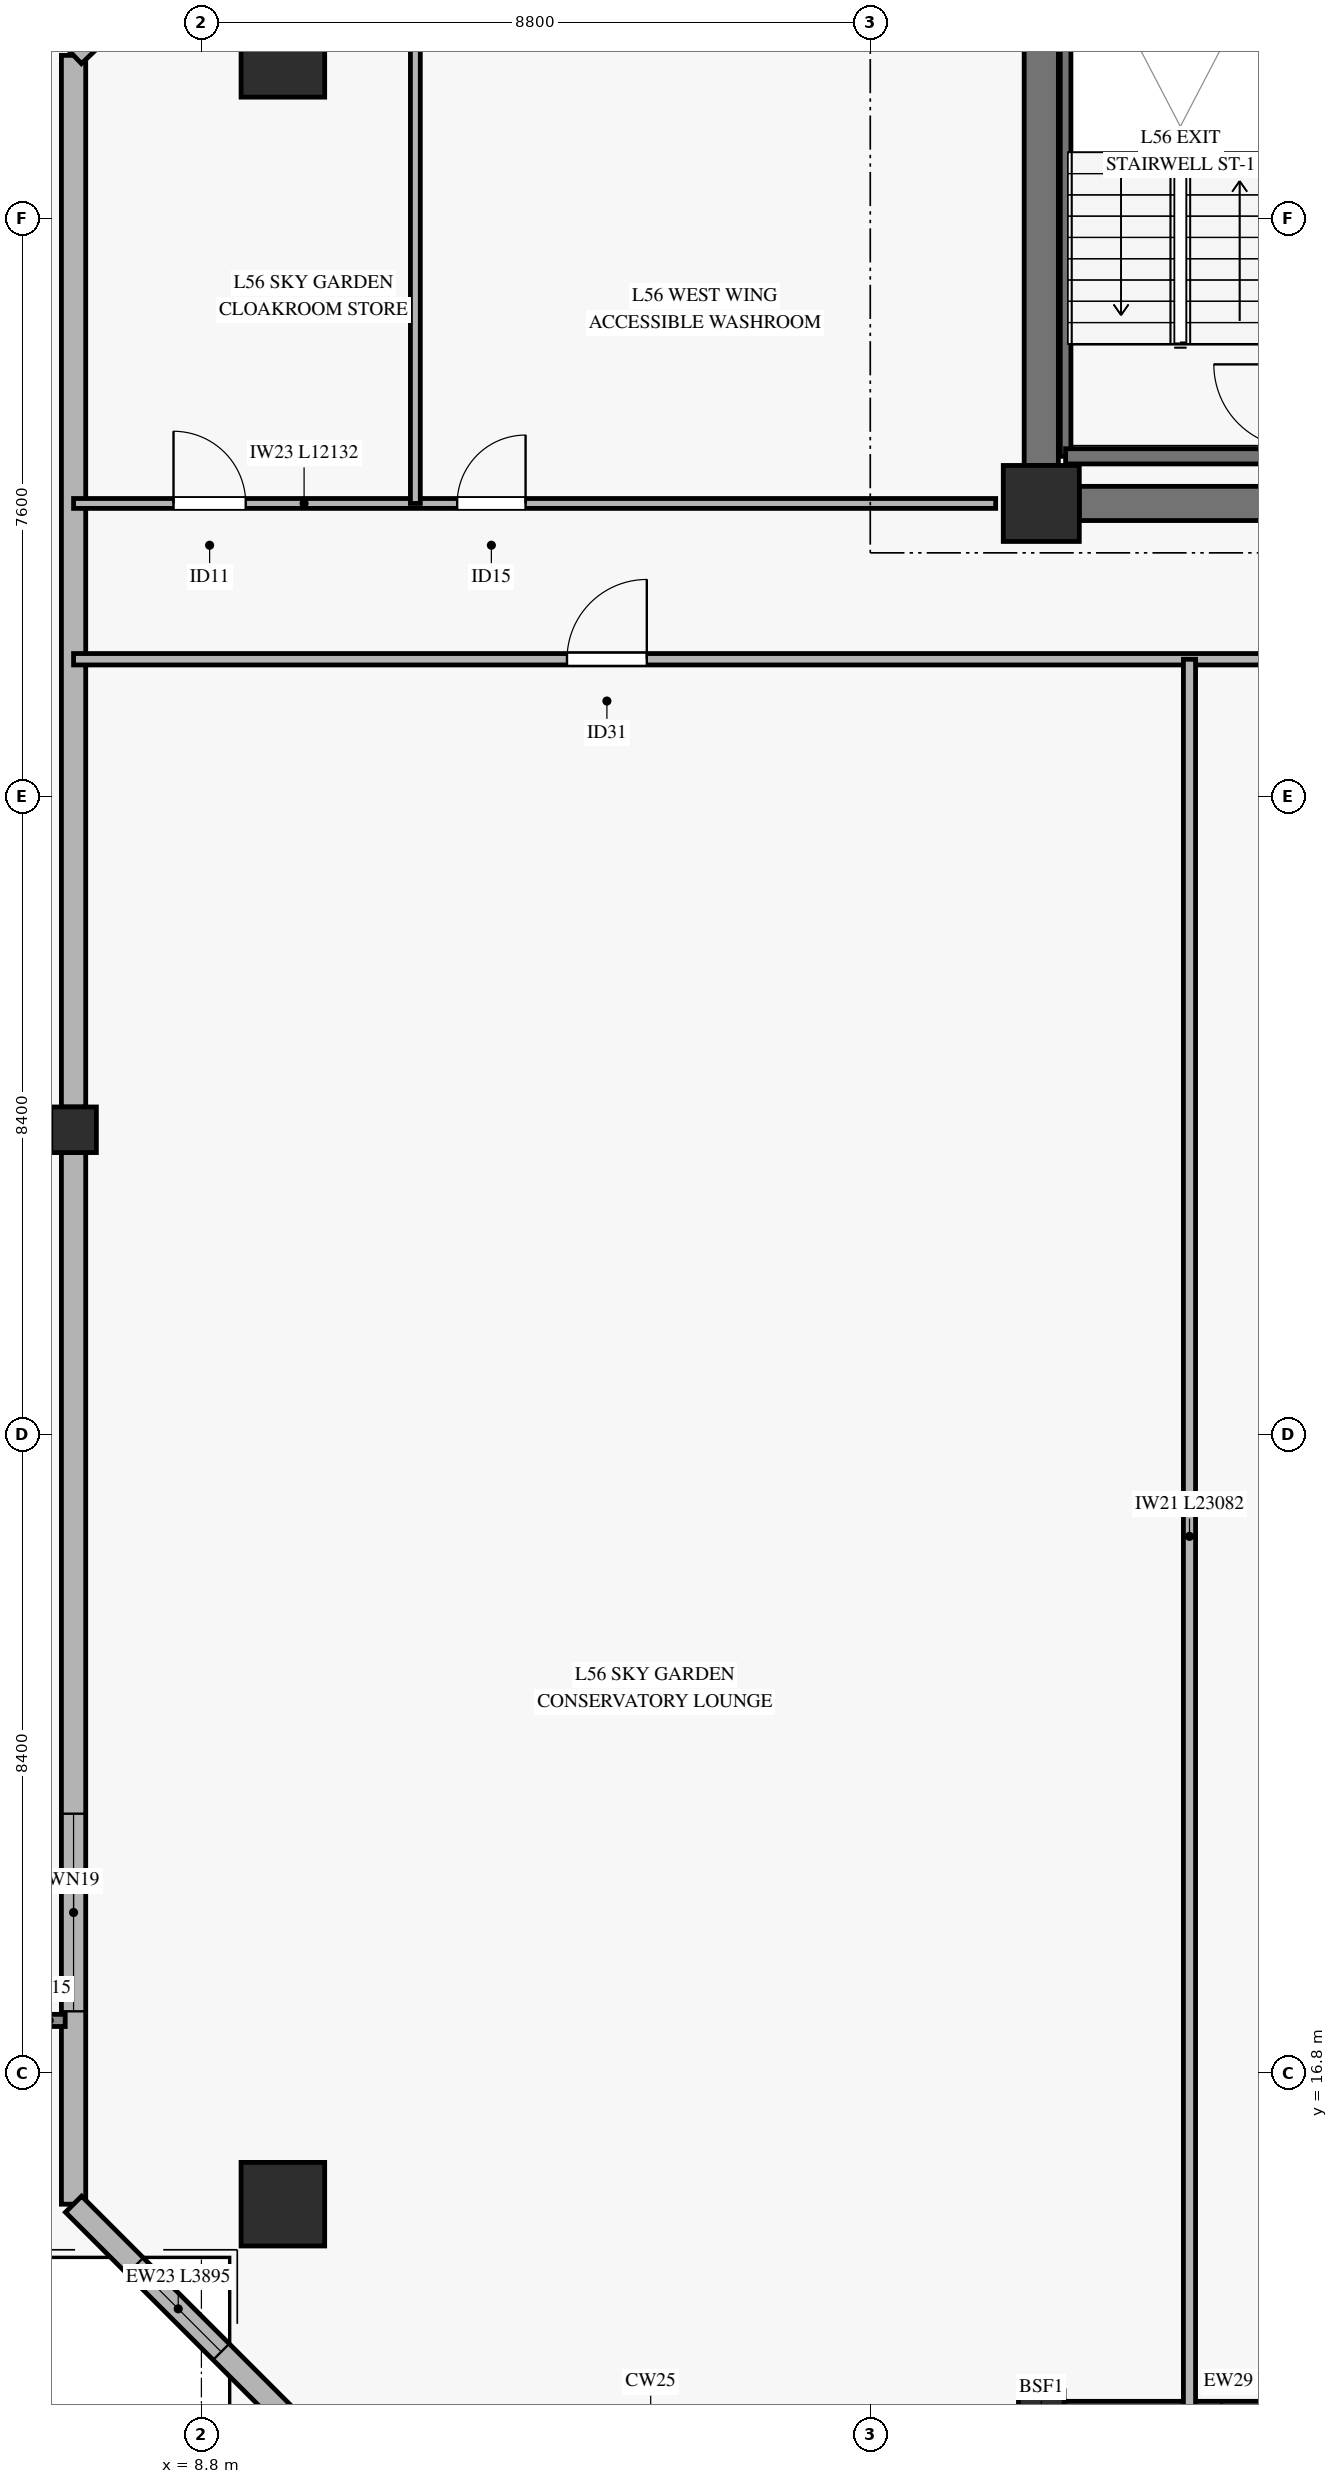
"""IFC4 building model, lengths in metres.
Left out: names, types, materials, properties, quantities, classifications, styles, units other than length and angle.
Written with IfcOpenShell. Run it as: python <this file> out.ifc"""

import sys

from ifc_helpers import new_model, si_unit, direction, frame, frame_2d, origin, origin_2d, place, context, subcontext, project, spatial, rectangle, hollow_rectangle, extrude, source, transform, mapped, element, fill, save


model = new_model("IFC4")
c1 = context("Model", 3, precision=1e-05, world=origin(), true_north=direction((0.0, 1.0)))
c2 = subcontext(c1, "Body", "Model", "MODEL_VIEW")
j1 = project(units=[si_unit("LENGTHUNIT", "METRE"), si_unit("PLANEANGLEUNIT", "RADIAN")], contexts=[c1])
p1 = place(None, origin())
s1 = spatial("IfcSite", under=j1, at=p1, CompositionType="ELEMENT")
p2 = place(p1, origin())
s2 = spatial("IfcBuilding", under=s1, at=p2, CompositionType="ELEMENT")
p3 = place(p2, frame((0.0, 0.0, 220.2)))
s3 = spatial("IfcBuildingStorey", under=s2, at=p3, CompositionType="ELEMENT", Elevation=220.2)
m1 = source(origin(), c2, "Body", "SweptSolid", [
    extrude(rectangle(XDim=1.0, YDim=1.0, at=origin_2d()), origin(), (0.0, 0.0, 1.0), 6.585),
])
p4 = place(p3, frame((19.85, 37.45, 0.0), z_axis=(0.0, 0.0, 1.0), x_axis=(1.0, 0.0, 0.0)))
e1 = element("IfcColumn", 1, at=p4, inside=s3, PredefinedType="PILASTER", context=c2, shape_type="MappedRepresentation", body=[
    mapped(m1, transform((0.0, 0.0, 0.0), x_axis=(1.0, 0.0, 0.0), y_axis=(0.0, 1.0, 0.0), z_axis=(0.0, 0.0, 1.0), scale=1.0)),
])
p5 = place(p3, frame((20.35, 37.45, 0.0), z_axis=(0.0, 0.0, 1.0), x_axis=(1.0, 0.0, 0.0)))
e2 = element("IfcWall", 2, at=p5, inside=s3, PredefinedType="SHEAR", context=c2, shape_type="SweptSolid", body=[
    extrude(rectangle(XDim=9.95, YDim=0.45, at=frame_2d((4.975, 0.0))), origin(), (0.0, 0.0, 1.0), 6.585),
])
p6 = place(p5, frame((4.2, 0.0, 0.0)))
e3 = element("IfcOpeningElement", 3, at=p6, cuts=e2, PredefinedType="OPENING", context=c2, shape_type="SweptSolid", body=[
    extrude(rectangle(XDim=1.2, YDim=2.15, at=frame_2d((0.6, 1.075))), frame((0.0, 0.235, 0.0), z_axis=(0.0, -1.0, 0.0), x_axis=(1.0, 0.0, 0.0)), (0.0, 0.0, 1.0), 0.47),
])
p7 = place(p3, frame((19.85, 37.95, 0.0), z_axis=(0.0, 0.0, 1.0), x_axis=(0.0, 1.0, 0.0)))
e4 = element("IfcWall", 4, at=p7, inside=s3, PredefinedType="SHEAR", context=c2, shape_type="SweptSolid", body=[
    extrude(rectangle(XDim=8.1, YDim=0.45, at=frame_2d((4.05, 0.0))), origin(), (0.0, 0.0, 1.0), 6.585),
])
m2 = source(origin(), c2, "Body", "SweptSolid", [
    extrude(hollow_rectangle(XDim=1.1, YDim=1.1, WallThickness=0.05, at=origin_2d()), origin(), (0.0, 0.0, 1.0), 6.654),
])
p8 = place(p3, frame((9.872, 15.072, 0.0), z_axis=(0.055290171783, 0.132997261257, 0.989573001553), x_axis=(-0.923385613651, 0.383873688213, 0.0)))
e5 = element("IfcColumn", 5, at=p8, inside=s3, PredefinedType="COLUMN", context=c2, shape_type="MappedRepresentation", body=[
    mapped(m2, transform((0.0, 0.0, 0.0), x_axis=(1.0, 0.0, 0.0), y_axis=(0.0, 1.0, 0.0), z_axis=(0.0, 0.0, 1.0), scale=1.0)),
])
m3 = source(origin(), c2, "Body", "SweptSolid", [
    extrude(hollow_rectangle(XDim=1.1, YDim=1.1, WallThickness=0.05, at=origin_2d()), origin(), (0.0, 0.0, 1.0), 6.595),
])
p9 = place(p3, frame((9.872, 43.346, 0.0), z_axis=(0.055784326108, 0.00714424349, 0.998417281874), x_axis=(-0.127031483929, 0.991898685396, 0.0)))
e6 = element("IfcColumn", 6, at=p9, inside=s3, PredefinedType="COLUMN", context=c2, shape_type="MappedRepresentation", body=[
    mapped(m3, transform((0.0, 0.0, 0.0), x_axis=(1.0, 0.0, 0.0), y_axis=(0.0, 1.0, 0.0), z_axis=(0.0, 0.0, 1.0), scale=1.0)),
])
m4 = source(origin(), c2, "Body", "SweptSolid", [
    extrude(hollow_rectangle(XDim=0.6, YDim=0.6, WallThickness=0.028, at=origin_2d()), origin(), (0.0, 0.0, 1.0), 6.651),
])
p10 = place(p3, frame((19.85, 12.318, 0.0), z_axis=(0.0, 0.140120976199, 0.990134390893), x_axis=(-1.0, 0.0, 0.0)))
e7 = element("IfcColumn", 7, at=p10, inside=s3, PredefinedType="COLUMN", context=c2, shape_type="MappedRepresentation", body=[
    mapped(m4, transform((0.0, 0.0, 0.0), x_axis=(1.0, 0.0, 0.0), y_axis=(0.0, 1.0, 0.0), z_axis=(0.0, 0.0, 1.0), scale=1.0)),
])
m5 = source(origin(), c2, "Body", "SweptSolid", [
    extrude(hollow_rectangle(XDim=0.6, YDim=0.6, WallThickness=0.028, at=origin_2d()), origin(), (0.0, 0.0, 1.0), 6.615),
])
p11 = place(p3, frame((7.118, 29.209, 0.0), z_axis=(0.062747159128, 0.070461368692, 0.995539044711), x_axis=(-0.746804669772, 0.665043446104, 0.0)))
e8 = element("IfcColumn", 8, at=p11, inside=s3, PredefinedType="COLUMN", context=c2, shape_type="MappedRepresentation", body=[
    mapped(m5, transform((0.0, 0.0, 0.0), x_axis=(1.0, 0.0, 0.0), y_axis=(0.0, 1.0, 0.0), z_axis=(0.0, 0.0, 1.0), scale=1.0)),
])
p12 = place(p3, frame((20.15, 12.318, 0.0), z_axis=(0.0, 0.0, 1.0), x_axis=(1.0, 0.0, 0.0)))
e9 = element("IfcWall", 9, at=p12, inside=s3, PredefinedType="SOLIDWALL", context=c2, shape_type="SweptSolid", body=[
    extrude(rectangle(XDim=10.35, YDim=0.32, at=frame_2d((5.175, 0.0))), origin(), (0.0, 0.0, 1.0), 6.065),
])
p13 = place(p12, frame((4.25, 0.0, 0.0)))
e10 = element("IfcOpeningElement", 10, at=p13, cuts=e9, PredefinedType="OPENING", context=c2, shape_type="SweptSolid", body=[
    extrude(rectangle(XDim=1.8, YDim=2.3, at=frame_2d((0.9, 1.15))), frame((0.0, 0.17, 0.0), z_axis=(0.0, -1.0, 0.0), x_axis=(1.0, 0.0, 0.0)), (0.0, 0.0, 1.0), 0.34),
])
p14 = place(p12, frame((2.07, 0.0, 0.45)))
e11 = element("IfcOpeningElement", 11, at=p14, cuts=e9, PredefinedType="OPENING", context=c2, shape_type="SweptSolid", body=[
    extrude(rectangle(XDim=1.6, YDim=2.0, at=frame_2d((0.8, 1.0))), frame((0.0, 0.17, 0.0), z_axis=(0.0, -1.0, 0.0), x_axis=(1.0, 0.0, 0.0)), (0.0, 0.0, 1.0), 0.34),
])
p15 = place(p12, frame((8.1, 0.0, 0.45)))
e12 = element("IfcOpeningElement", 12, at=p15, cuts=e9, PredefinedType="OPENING", context=c2, shape_type="SweptSolid", body=[
    extrude(rectangle(XDim=1.6, YDim=2.0, at=frame_2d((0.8, 1.0))), frame((0.0, 0.17, 0.0), z_axis=(0.0, -1.0, 0.0), x_axis=(1.0, 0.0, 0.0)), (0.0, 0.0, 1.0), 0.34),
])
p16 = place(p3, frame((7.118, 15.072, 0.0), z_axis=(0.0, 0.0, 1.0), x_axis=(0.0, 1.0, 0.0)))
e13 = element("IfcWall", 13, at=p16, inside=s3, PredefinedType="SOLIDWALL", context=c2, shape_type="SweptSolid", body=[
    extrude(rectangle(XDim=13.837, YDim=0.32, at=frame_2d((6.918, 0.0))), origin(), (0.0, 0.0, 1.0), 6.065),
])
p17 = place(p16, frame((2.538, 0.0, 0.45)))
e14 = element("IfcOpeningElement", 14, at=p17, cuts=e13, PredefinedType="OPENING", context=c2, shape_type="SweptSolid", body=[
    extrude(rectangle(XDim=2.6, YDim=2.4, at=frame_2d((1.3, 1.2))), frame((0.0, 0.17, 0.0), z_axis=(0.0, -1.0, 0.0), x_axis=(1.0, 0.0, 0.0)), (0.0, 0.0, 1.0), 0.34),
])
p18 = place(p3, frame((7.118, 29.509, 0.0), z_axis=(0.0, 0.0, 1.0), x_axis=(0.0, 1.0, 0.0)))
e15 = element("IfcWall", 15, at=p18, inside=s3, PredefinedType="SOLIDWALL", context=c2, shape_type="SweptSolid", body=[
    extrude(rectangle(XDim=13.837, YDim=0.32, at=frame_2d((6.918, 0.0))), origin(), (0.0, 0.0, 1.0), 6.065),
])
p19 = place(p3, frame((7.118, 15.072, 0.0), z_axis=(0.0, 0.0, 1.0), x_axis=(0.707138122488, -0.707075438496, 0.0)))
e16 = element("IfcWall", 16, at=p19, inside=s3, PredefinedType="SOLIDWALL", context=c2, shape_type="SweptSolid", body=[
    extrude(rectangle(XDim=3.895, YDim=0.3, at=frame_2d((1.947, 0.0))), origin(), (0.0, 0.0, 1.0), 6.065),
])
p20 = place(p19, frame((1.147, 0.0, 0.45)))
e17 = element("IfcOpeningElement", 17, at=p20, cuts=e16, PredefinedType="OPENING", context=c2, shape_type="SweptSolid", body=[
    extrude(rectangle(XDim=1.6, YDim=2.0, at=frame_2d((0.8, 1.0))), frame((0.0, 0.16, 0.0), z_axis=(0.0, -1.0, 0.0), x_axis=(1.0, 0.0, 0.0)), (0.0, 0.0, 1.0), 0.32),
])
p21 = place(p3, frame((10.172, 46.25, 0.0), z_axis=(0.0, 0.0, 1.0), x_axis=(-0.72469563388, -0.689069109912, 0.0)))
e18 = element("IfcWall", 18, at=p21, inside=s3, PredefinedType="SOLIDWALL", context=c2, shape_type="SweptSolid", body=[
    extrude(rectangle(XDim=4.214, YDim=0.3, at=frame_2d((2.107, 0.0))), origin(), (0.0, 0.0, 1.0), 6.065),
])
p22 = place(p21, frame((1.307, 0.0, 0.45)))
e19 = element("IfcOpeningElement", 19, at=p22, cuts=e18, PredefinedType="OPENING", context=c2, shape_type="SweptSolid", body=[
    extrude(rectangle(XDim=1.6, YDim=2.0, at=frame_2d((0.8, 1.0))), frame((0.0, 0.16, 0.0), z_axis=(0.0, -1.0, 0.0), x_axis=(1.0, 0.0, 0.0)), (0.0, 0.0, 1.0), 0.32),
])
p23 = place(p3, frame((20.17, 38.07, 0.0), z_axis=(0.0, 0.0, 1.0), x_axis=(0.0, 1.0, 0.0)))
e20 = element("IfcWall", 20, at=p23, inside=s3, PredefinedType="SOLIDWALL", context=c2, shape_type="SweptSolid", body=[
    extrude(rectangle(XDim=7.25, YDim=0.14, at=frame_2d((3.625, 0.0))), origin(), (0.0, 0.0, 1.0), 6.8),
])
p24 = place(p3, frame((20.17, 38.07, 0.0), z_axis=(0.0, 0.0, 1.0), x_axis=(1.0, 0.0, 0.0)))
e21 = element("IfcWall", 21, at=p24, inside=s3, PredefinedType="SOLIDWALL", context=c2, shape_type="SweptSolid", body=[
    extrude(rectangle(XDim=3.05, YDim=0.2, at=frame_2d((1.525, 0.0))), origin(), (0.0, 0.0, 1.0), 6.8),
])
p25 = place(p3, frame((7.118, 35.4, 0.0), z_axis=(0.0, 0.0, 1.0), x_axis=(1.0, 0.0, 0.0)))
e22 = element("IfcWall", 22, at=p25, inside=s3, PredefinedType="PARTITIONING", context=c2, shape_type="SweptSolid", body=[
    extrude(rectangle(XDim=56.164, YDim=0.15, at=frame_2d((28.082, 0.0))), origin(), (0.0, 0.0, 1.0), 5.77),
])
p26 = place(p25, frame((6.492, 0.0, 0.0)))
e23 = element("IfcOpeningElement", 23, at=p26, cuts=e22, PredefinedType="OPENING", context=c2, shape_type="SweptSolid", body=[
    extrude(rectangle(XDim=1.05, YDim=2.15, at=frame_2d((0.525, 1.075))), frame((0.0, 0.085, 0.0), z_axis=(0.0, -1.0, 0.0), x_axis=(1.0, 0.0, 0.0)), (0.0, 0.0, 1.0), 0.17),
])
p27 = place(p25, frame((18.772, 0.0, 0.0)))
e24 = element("IfcOpeningElement", 24, at=p27, cuts=e22, PredefinedType="OPENING", context=c2, shape_type="SweptSolid", body=[
    extrude(rectangle(XDim=1.05, YDim=2.15, at=frame_2d((0.525, 1.075))), frame((0.0, 0.085, 0.0), z_axis=(0.0, -1.0, 0.0), x_axis=(1.0, 0.0, 0.0)), (0.0, 0.0, 1.0), 0.17),
])
p28 = place(p25, frame((26.372, 0.0, 0.0)))
e25 = element("IfcOpeningElement", 25, at=p28, cuts=e22, PredefinedType="OPENING", context=c2, shape_type="SweptSolid", body=[
    extrude(rectangle(XDim=1.05, YDim=2.15, at=frame_2d((0.525, 1.075))), frame((0.0, 0.085, 0.0), z_axis=(0.0, -1.0, 0.0), x_axis=(1.0, 0.0, 0.0)), (0.0, 0.0, 1.0), 0.17),
])
p29 = place(p25, frame((34.972, 0.0, 0.0)))
e26 = element("IfcOpeningElement", 26, at=p29, cuts=e22, PredefinedType="OPENING", context=c2, shape_type="SweptSolid", body=[
    extrude(rectangle(XDim=1.05, YDim=2.15, at=frame_2d((0.525, 1.075))), frame((0.0, 0.085, 0.0), z_axis=(0.0, -1.0, 0.0), x_axis=(1.0, 0.0, 0.0)), (0.0, 0.0, 1.0), 0.17),
])
p30 = place(p25, frame((45.319, 0.0, 0.0)))
e27 = element("IfcOpeningElement", 27, at=p30, cuts=e22, PredefinedType="OPENING", context=c2, shape_type="SweptSolid", body=[
    extrude(rectangle(XDim=1.05, YDim=2.15, at=frame_2d((0.525, 1.075))), frame((0.0, 0.085, 0.0), z_axis=(0.0, -1.0, 0.0), x_axis=(1.0, 0.0, 0.0)), (0.0, 0.0, 1.0), 0.17),
])
p31 = place(p3, frame((21.8, 12.318, 0.0), z_axis=(0.0, 0.0, 1.0), x_axis=(0.0, 1.0, 0.0)))
e28 = element("IfcWall", 28, at=p31, inside=s3, PredefinedType="PARTITIONING", context=c2, shape_type="SweptSolid", body=[
    extrude(rectangle(XDim=23.082, YDim=0.16, at=frame_2d((11.541, 0.0))), origin(), (0.0, 0.0, 1.0), 6.07),
])
p32 = place(p3, frame((7.118, 37.45, 0.0), z_axis=(0.0, 0.0, 1.0), x_axis=(1.0, 0.0, 0.0)))
e29 = element("IfcWall", 29, at=p32, inside=s3, PredefinedType="PARTITIONING", context=c2, shape_type="SweptSolid", body=[
    extrude(rectangle(XDim=12.132, YDim=0.13, at=frame_2d((6.066, 0.0))), origin(), (0.0, 0.0, 1.0), 6.07),
])
p33 = place(p32, frame((1.315, 0.0, 0.0)))
e30 = element("IfcOpeningElement", 30, at=p33, cuts=e29, PredefinedType="OPENING", context=c2, shape_type="SweptSolid", body=[
    extrude(rectangle(XDim=0.95, YDim=2.1, at=frame_2d((0.475, 1.05))), frame((0.0, 0.075, 0.0), z_axis=(0.0, -1.0, 0.0), x_axis=(1.0, 0.0, 0.0)), (0.0, 0.0, 1.0), 0.15),
])
p34 = place(p32, frame((5.047, 0.0, 0.0)))
e31 = element("IfcOpeningElement", 31, at=p34, cuts=e29, PredefinedType="OPENING", context=c2, shape_type="SweptSolid", body=[
    extrude(rectangle(XDim=0.9, YDim=2.1, at=frame_2d((0.45, 1.05))), frame((0.0, 0.075, 0.0), z_axis=(0.0, -1.0, 0.0), x_axis=(1.0, 0.0, 0.0)), (0.0, 0.0, 1.0), 0.15),
])
p35 = place(p3, frame((11.615, 37.45, 0.0), z_axis=(0.0, 0.0, 1.0), x_axis=(0.0, 1.0, 0.0)))
e32 = element("IfcWall", 32, at=p35, inside=s3, PredefinedType="PARTITIONING", context=c2, shape_type="SweptSolid", body=[
    extrude(rectangle(XDim=8.8, YDim=0.13, at=frame_2d((4.4, 0.0))), origin(), (0.0, 0.0, 1.0), 6.585),
])
m6 = source(origin(), c2, "Body", "SweptSolid", [
    extrude(rectangle(XDim=2.6, YDim=2.4, at=frame_2d((1.3, 1.2))), frame((0.0, 0.03, 0.0), z_axis=(0.0, -1.0, 0.0), x_axis=(1.0, 0.0, 0.0)), (0.0, 0.0, 1.0), 0.06),
])
p36 = place(p17, origin())
e33 = element("IfcWindow", 33, at=p36, inside=s3, PartitioningType="SINGLE_PANEL", PredefinedType="WINDOW", context=c2, shape_type="MappedRepresentation", body=[
    mapped(m6, transform((0.0, 0.0, 0.0), x_axis=(1.0, 0.0, 0.0), y_axis=(0.0, 1.0, 0.0), z_axis=(0.0, 0.0, 1.0), scale=1.0)),
])
fill(e14, e33)
m7 = source(origin(), c2, "Body", "SweptSolid", [
    extrude(rectangle(XDim=1.6, YDim=2.0, at=frame_2d((0.8, 1.0))), frame((0.0, 0.03, 0.0), z_axis=(0.0, -1.0, 0.0), x_axis=(1.0, 0.0, 0.0)), (0.0, 0.0, 1.0), 0.06),
])
p37 = place(p20, origin())
e34 = element("IfcWindow", 34, at=p37, inside=s3, PartitioningType="SINGLE_PANEL", PredefinedType="WINDOW", context=c2, shape_type="MappedRepresentation", body=[
    mapped(m7, transform((0.0, 0.0, 0.0), x_axis=(1.0, 0.0, 0.0), y_axis=(0.0, 1.0, 0.0), z_axis=(0.0, 0.0, 1.0), scale=1.0)),
])
fill(e17, e34)
m8 = source(origin(), c2, "Body", "SweptSolid", [
    extrude(rectangle(XDim=1.05, YDim=2.15, at=frame_2d((0.525, 1.075))), frame((0.0, 0.025, 0.0), z_axis=(0.0, -1.0, 0.0), x_axis=(1.0, 0.0, 0.0)), (0.0, 0.0, 1.0), 0.05),
])
p38 = place(p26, origin())
e35 = element("IfcDoor", 35, at=p38, inside=s3, OperationType="SINGLE_SWING_RIGHT", PredefinedType="DOOR", context=c2, shape_type="MappedRepresentation", body=[
    mapped(m8, transform((0.0, 0.0, 0.0), x_axis=(1.0, 0.0, 0.0), y_axis=(0.0, 1.0, 0.0), z_axis=(0.0, 0.0, 1.0), scale=1.0)),
])
fill(e23, e35)
m9 = source(origin(), c2, "Body", "SweptSolid", [
    extrude(rectangle(XDim=0.95, YDim=2.1, at=frame_2d((0.475, 1.05))), frame((0.0, 0.025, 0.0), z_axis=(0.0, -1.0, 0.0), x_axis=(1.0, 0.0, 0.0)), (0.0, 0.0, 1.0), 0.05),
])
p39 = place(p33, origin())
e36 = element("IfcDoor", 36, at=p39, inside=s3, OperationType="SINGLE_SWING_LEFT", PredefinedType="DOOR", context=c2, shape_type="MappedRepresentation", body=[
    mapped(m9, transform((0.0, 0.0, 0.0), x_axis=(1.0, 0.0, 0.0), y_axis=(0.0, 1.0, 0.0), z_axis=(0.0, 0.0, 1.0), scale=1.0)),
])
fill(e30, e36)
m10 = source(origin(), c2, "Body", "SweptSolid", [
    extrude(rectangle(XDim=0.9, YDim=2.1, at=frame_2d((0.45, 1.05))), frame((0.0, 0.025, 0.0), z_axis=(0.0, -1.0, 0.0), x_axis=(1.0, 0.0, 0.0)), (0.0, 0.0, 1.0), 0.05),
])
p40 = place(p34, origin())
e37 = element("IfcDoor", 37, at=p40, inside=s3, OperationType="SINGLE_SWING_RIGHT", PredefinedType="DOOR", context=c2, shape_type="MappedRepresentation", body=[
    mapped(m10, transform((0.0, 0.0, 0.0), x_axis=(1.0, 0.0, 0.0), y_axis=(0.0, 1.0, 0.0), z_axis=(0.0, 0.0, 1.0), scale=1.0)),
])
fill(e31, e37)
save(model, sys.argv[1])
